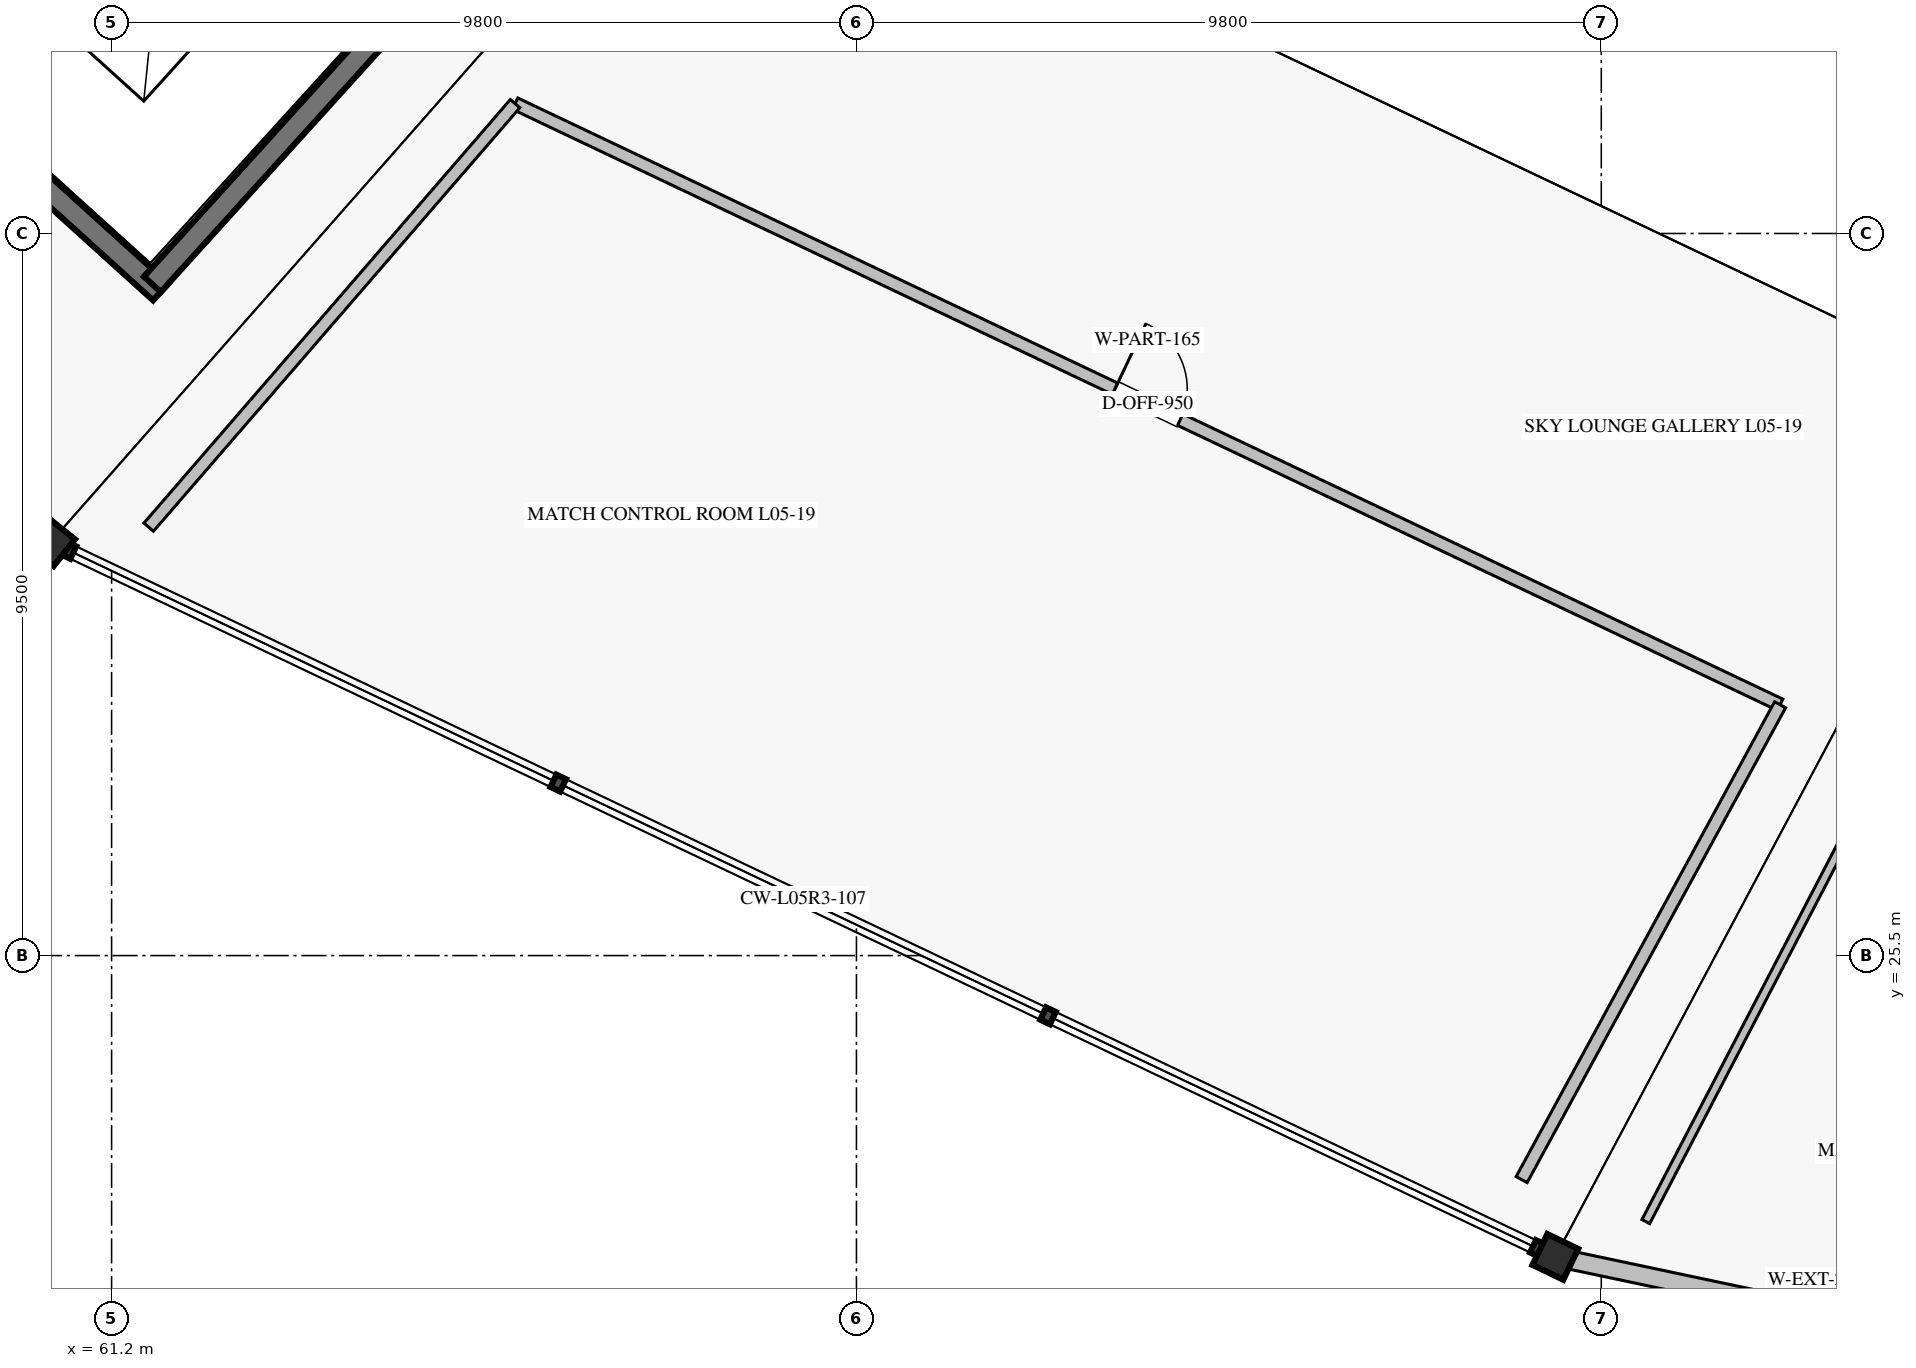
"""IFC4 building model, lengths in metres.
Left out: names, types, materials, properties, quantities, classifications, styles, units other than length and angle.
Written with IfcOpenShell. Run it as: python <this file> out.ifc"""

import sys

from ifc_helpers import new_model, si_unit, direction, frame, frame_2d, origin, origin_2d, place, context, subcontext, project, spatial, rectangle, hollow_rectangle, extrude, element, fill, save


model = new_model("IFC4")
c1 = context("Model", 3, precision=1e-05, world=origin(), true_north=direction((0.0, 1.0)))
c2 = subcontext(c1, "Body", "Model", "MODEL_VIEW")
j1 = project(units=[si_unit("LENGTHUNIT", "METRE"), si_unit("PLANEANGLEUNIT", "RADIAN")], contexts=[c1])
p1 = place(None, origin())
s1 = spatial("IfcSite", under=j1, at=p1, CompositionType="ELEMENT")
p2 = place(p1, origin())
s2 = spatial("IfcBuilding", under=s1, at=p2, CompositionType="ELEMENT")
p3 = place(p2, frame((0.0, 0.0, 25.84)))
s3 = spatial("IfcBuildingStorey", under=s2, at=p3, CompositionType="ELEMENT", Elevation=25.84)
for number, where, z_axis, x_axis in (
    (1, (60.402, 30.941, 0.0), (0.0, 0.0, 1.0), (-0.623, -0.782, 0.0)),
    (2, (80.195, 21.536, 0.0), (0.0, 0.0, 1.0), (-0.434, -0.901, 0.0)),
):
    element("IfcColumn", number, at=place(p3, frame(where, z_axis=z_axis, x_axis=x_axis)), inside=s3, PredefinedType="COLUMN", context=c2, shape_type="SweptSolid", body=[
        extrude(hollow_rectangle(XDim=0.45, YDim=0.45, WallThickness=0.022, at=origin_2d()), origin(), (0.0, 0.0, 1.0), 5.44),
    ])
p4 = place(p3, frame((80.41, 21.49, 0.0), z_axis=(0.0, 0.0, 1.0), x_axis=(0.978344108288, -0.206985037572, 0.0)))
e3 = element("IfcWall", 3, at=p4, inside=s3, PredefinedType="SOLIDWALL", context=c2, shape_type="SweptSolid", body=[
    extrude(rectangle(XDim=21.41, YDim=0.24, at=frame_2d((10.705, 0.0))), origin(), (0.0, 0.0, 1.0), 4.53),
])
p5 = place(p4, frame((3.557, 0.0, 1.65)))
e4 = element("IfcOpeningElement", 4, at=p5, cuts=e3, PredefinedType="OPENING", context=c2, shape_type="SweptSolid", body=[
    extrude(rectangle(XDim=1.45, YDim=0.95, at=frame_2d((0.725, 0.475))), frame((0.0, 0.13, 0.0), z_axis=(0.0, -1.0, 0.0), x_axis=(1.0, 0.0, 0.0)), (0.0, 0.0, 1.0), 0.26),
])
p6 = place(p4, frame((10.737, 0.0, 1.65)))
e5 = element("IfcOpeningElement", 5, at=p6, cuts=e3, PredefinedType="OPENING", context=c2, shape_type="SweptSolid", body=[
    extrude(rectangle(XDim=1.65, YDim=1.0, at=frame_2d((0.825, 0.5))), frame((0.0, 0.13, 0.0), z_axis=(0.0, -1.0, 0.0), x_axis=(1.0, 0.0, 0.0)), (0.0, 0.0, 1.0), 0.26),
])
p7 = place(p4, frame((17.385, 0.0, 1.65)))
e6 = element("IfcOpeningElement", 6, at=p7, cuts=e3, PredefinedType="OPENING", context=c2, shape_type="SweptSolid", body=[
    extrude(rectangle(XDim=1.2, YDim=0.9, at=frame_2d((0.6, 0.45))), frame((0.0, 0.13, 0.0), z_axis=(0.0, -1.0, 0.0), x_axis=(1.0, 0.0, 0.0)), (0.0, 0.0, 1.0), 0.26),
])
p8 = place(p3, frame((57.64, 38.039, 0.0), z_axis=(0.0, 0.0, 1.0), x_axis=(0.74134208775, -0.671127341815, 0.0)))
e7 = element("IfcWall", 7, at=p8, inside=s3, PredefinedType="SHEAR", context=c2, shape_type="SweptSolid", body=[
    extrude(rectangle(XDim=5.675, YDim=0.3, at=frame_2d((2.837, 0.0))), origin(), (0.0, 0.0, 1.0), 5.18),
])
p9 = place(p3, frame((65.676, 38.684, 0.0), z_axis=(0.0, 0.0, 1.0), x_axis=(-0.67115829282, -0.741314067031, 0.0)))
e8 = element("IfcWall", 8, at=p9, inside=s3, PredefinedType="SHEAR", context=c2, shape_type="SweptSolid", body=[
    extrude(rectangle(XDim=5.871, YDim=0.3, at=frame_2d((2.935, 0.0))), origin(), (0.0, 0.0, 1.0), 5.18),
])
p10 = place(p3, frame((66.509, 36.708, 0.0), z_axis=(0.0, 0.0, 1.0), x_axis=(0.90321677741, -0.429184637429, 0.0)))
e9 = element("IfcWall", 9, at=p10, inside=s3, PredefinedType="PARTITIONING", context=c2, shape_type="SweptSolid", body=[
    extrude(rectangle(XDim=18.427, YDim=0.165, at=frame_2d((9.214, 0.0))), origin(), (0.0, 0.0, 1.0), 4.5),
])
p11 = place(p10, frame((8.739, 0.0, 0.0)))
e10 = element("IfcOpeningElement", 10, at=p11, cuts=e9, PredefinedType="OPENING", context=c2, shape_type="SweptSolid", body=[
    extrude(rectangle(XDim=0.95, YDim=2.15, at=frame_2d((0.475, 1.075))), frame((0.0, 0.093, 0.0), z_axis=(0.0, -1.0, 0.0), x_axis=(1.0, 0.0, 0.0)), (0.0, 0.0, 1.0), 0.185),
])
p12 = place(p3, frame((66.509, 36.708, 0.0), z_axis=(0.0, 0.0, 1.0), x_axis=(-0.654288201841, -0.7562452968, 0.0)))
e11 = element("IfcWall", 11, at=p12, inside=s3, PredefinedType="PARTITIONING", context=c2, shape_type="SweptSolid", body=[
    extrude(rectangle(XDim=7.368, YDim=0.165, at=frame_2d((3.684, 0.0))), origin(), (0.0, 0.0, 1.0), 4.5),
])
p13 = place(p3, frame((83.153, 28.8, 0.0), z_axis=(0.0, 0.0, 1.0), x_axis=(-0.47812325427, -0.878292749444, 0.0)))
e12 = element("IfcWall", 12, at=p13, inside=s3, PredefinedType="PARTITIONING", context=c2, shape_type="SweptSolid", body=[
    extrude(rectangle(XDim=7.113, YDim=0.165, at=frame_2d((3.556, 0.0))), origin(), (0.0, 0.0, 1.0), 4.5),
])
p14 = place(p3, frame((84.658, 28.29, 0.0), z_axis=(0.0, 0.0, 1.0), x_axis=(-0.461466568794, -0.887157599238, 0.0)))
e13 = element("IfcWall", 13, at=p14, inside=s3, PredefinedType="PARTITIONING", context=c2, shape_type="SweptSolid", body=[
    extrude(rectangle(XDim=7.09, YDim=0.115, at=frame_2d((3.545, 0.0))), origin(), (0.0, 0.0, 1.0), 4.5),
])
p15 = place(p11, origin())
e14 = element("IfcDoor", 14, at=p15, inside=s3, OperationType="SINGLE_SWING_LEFT", PredefinedType="DOOR", context=c2, shape_type="SweptSolid", body=[
    extrude(rectangle(XDim=0.95, YDim=2.15, at=frame_2d((0.475, 1.075))), frame((0.0, 0.025, 0.0), z_axis=(0.0, -1.0, 0.0), x_axis=(1.0, 0.0, 0.0)), (0.0, 0.0, 1.0), 0.05),
])
fill(e10, e14)
save(model, sys.argv[1])
